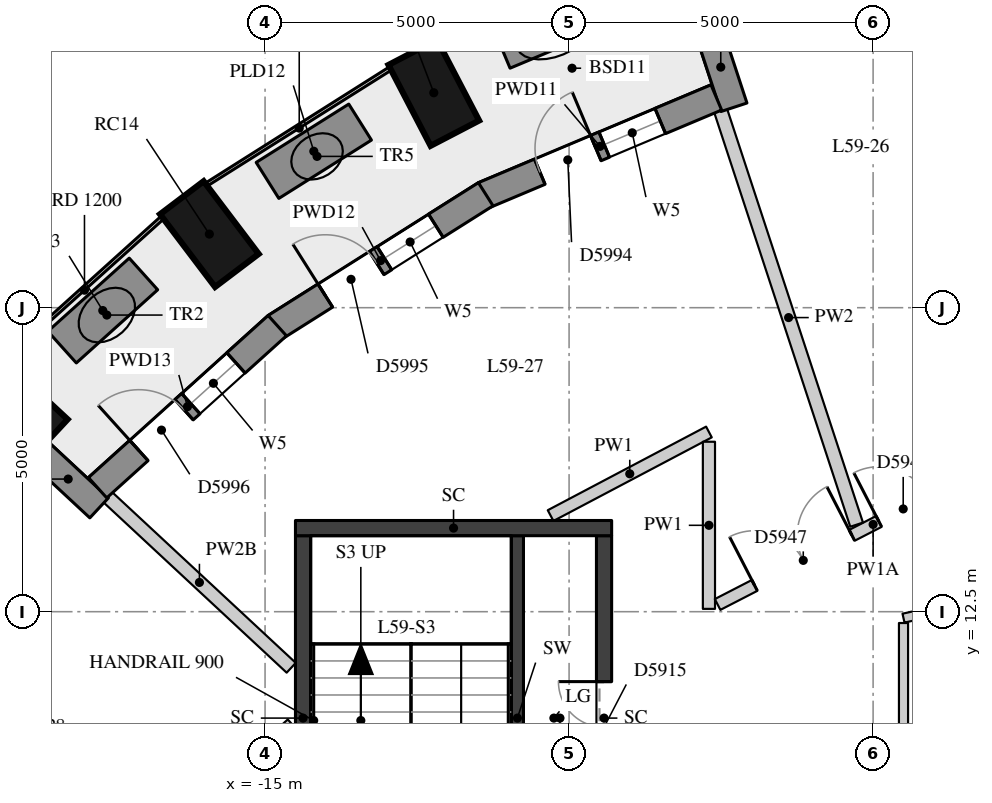
"""IFC4 building model, lengths in metres.
Left out: names, types, materials, properties, quantities, classifications, styles, units other than length and angle.
Written with IfcOpenShell. Run it as: python <this file> out.ifc"""

import sys

from ifc_helpers import new_model, si_unit, direction, frame, frame_2d, origin, origin_2d, place, context, subcontext, project, spatial, rectangle, extrude, element, fill, save


model = new_model("IFC4")
c1 = context("Model", 3, precision=1e-05, world=origin(), true_north=direction((0.0, 1.0)))
c2 = subcontext(c1, "Body", "Model", "MODEL_VIEW")
j1 = project(units=[si_unit("LENGTHUNIT", "METRE"), si_unit("PLANEANGLEUNIT", "RADIAN")], contexts=[c1])
p1 = place(None, origin())
s1 = spatial("IfcSite", under=j1, at=p1, CompositionType="ELEMENT")
p2 = place(p1, origin())
s2 = spatial("IfcBuilding", under=s1, at=p2, CompositionType="ELEMENT")
p3 = place(p2, frame((0.0, 0.0, 209.0)))
s3 = spatial("IfcBuildingStorey", under=s2, at=p3, CompositionType="ELEMENT", Elevation=209.0)
for number, where, z_axis, x_axis in (
    (1, (-12.225, 21.035, 0.0), (0.0, 0.0, 1.0), (-0.462, 0.887, 0.0)),
    (2, (-15.916, 18.71, 0.0), (0.0, 0.0, 1.0), (-0.604, 0.797, 0.0)),
    (3, (-19.102, 15.845, 0.0), (0.0, 0.0, 1.0), (-0.732, 0.681, 0.0)),
):
    element("IfcColumn", number, at=place(p3, frame(where, z_axis=z_axis, x_axis=x_axis)), inside=s3, PredefinedType="COLUMN", context=c2, shape_type="SweptSolid", body=[
        extrude(rectangle(XDim=1.5, YDim=0.9, at=origin_2d()), origin(), (0.0, 0.0, 1.0), 3.3),
    ])
p4 = place(p3, frame((-7.722, 22.117, 0.0), z_axis=(0.0, 0.0, 1.0), x_axis=(0.312062715826, -0.950061504005, 0.0)))
e4 = element("IfcWall", 4, at=p4, inside=s3, PredefinedType="SOLIDWALL", context=c2, shape_type="SweptSolid", body=[
    extrude(rectangle(XDim=1.39, YDim=0.45, at=frame_2d((0.695, 0.0))), origin(), (0.0, 0.0, 1.0), 3.02),
])
p5 = place(p3, frame((-18.747, 15.155, 0.0), z_axis=(0.0, 0.0, 1.0), x_axis=(0.732349544388, -0.680928883831, 0.0)))
e5 = element("IfcWall", 5, at=p5, inside=s3, PredefinedType="SOLIDWALL", context=c2, shape_type="SweptSolid", body=[
    extrude(rectangle(XDim=1.391, YDim=0.45, at=frame_2d((0.696, 0.0))), origin(), (0.0, 0.0, 1.0), 2.57),
])
p6 = place(p3, frame((-7.579, 20.958, 0.0), z_axis=(0.0, 0.0, 1.0), x_axis=(-0.921750495838, -0.387783474923, 0.0)))
e6 = element("IfcWall", 6, at=p6, inside=s3, PredefinedType="SOLIDWALL", context=c2, shape_type="SweptSolid", body=[
    extrude(rectangle(XDim=4.15, YDim=0.45, at=frame_2d((2.075, 0.0))), origin(), (0.0, 0.0, 1.0), 3.02),
])
p7 = place(p6, frame((1.0, 0.0, 0.4)))
e7 = element("IfcOpeningElement", 7, at=p7, cuts=e6, PredefinedType="OPENING", context=c2, shape_type="SweptSolid", body=[
    extrude(rectangle(XDim=1.0, YDim=1.75, at=frame_2d((0.5, 0.875))), frame((0.0, 0.235, 0.0), z_axis=(0.0, -1.0, 0.0), x_axis=(1.0, 0.0, 0.0)), (0.0, 0.0, 1.0), 0.47),
])
p8 = place(p6, frame((2.15, 0.0, 0.0)))
e8 = element("IfcOpeningElement", 8, at=p8, cuts=e6, PredefinedType="OPENING", context=c2, shape_type="SweptSolid", body=[
    extrude(rectangle(XDim=1.0, YDim=2.15, at=frame_2d((0.5, 1.075))), frame((0.0, 0.235, 0.0), z_axis=(0.0, -1.0, 0.0), x_axis=(1.0, 0.0, 0.0)), (0.0, 0.0, 1.0), 0.47),
])
p9 = place(p3, frame((-11.371, 19.366, 0.0), z_axis=(0.0, 0.0, 1.0), x_axis=(-0.845443515445, -0.534064848302, 0.0)))
e9 = element("IfcWall", 9, at=p9, inside=s3, PredefinedType="SOLIDWALL", context=c2, shape_type="SweptSolid", body=[
    extrude(rectangle(XDim=4.091, YDim=0.45, at=frame_2d((2.045, 0.0))), origin(), (0.0, 0.0, 1.0), 3.02),
])
p10 = place(p9, frame((0.97, 0.0, 0.4)))
e10 = element("IfcOpeningElement", 10, at=p10, cuts=e9, PredefinedType="OPENING", context=c2, shape_type="SweptSolid", body=[
    extrude(rectangle(XDim=1.0, YDim=1.75, at=frame_2d((0.5, 0.875))), frame((0.0, 0.235, 0.0), z_axis=(0.0, -1.0, 0.0), x_axis=(1.0, 0.0, 0.0)), (0.0, 0.0, 1.0), 0.47),
])
p11 = place(p9, frame((2.12, 0.0, 0.0)))
e11 = element("IfcOpeningElement", 11, at=p11, cuts=e9, PredefinedType="OPENING", context=c2, shape_type="SweptSolid", body=[
    extrude(rectangle(XDim=1.0, YDim=2.15, at=frame_2d((0.5, 1.075))), frame((0.0, 0.235, 0.0), z_axis=(0.0, -1.0, 0.0), x_axis=(1.0, 0.0, 0.0)), (0.0, 0.0, 1.0), 0.47),
])
p12 = place(p3, frame((-14.799, 17.205, 0.0), z_axis=(0.0, 0.0, 1.0), x_axis=(-0.742488361714, -0.669858964798, 0.0)))
e12 = element("IfcWall", 12, at=p12, inside=s3, PredefinedType="SOLIDWALL", context=c2, shape_type="SweptSolid", body=[
    extrude(rectangle(XDim=3.98, YDim=0.45, at=frame_2d((1.99, 0.0))), origin(), (0.0, 0.0, 1.0), 3.02),
])
p13 = place(p12, frame((0.915, 0.0, 0.4)))
e13 = element("IfcOpeningElement", 13, at=p13, cuts=e12, PredefinedType="OPENING", context=c2, shape_type="SweptSolid", body=[
    extrude(rectangle(XDim=1.0, YDim=1.75, at=frame_2d((0.5, 0.875))), frame((0.0, 0.235, 0.0), z_axis=(0.0, -1.0, 0.0), x_axis=(1.0, 0.0, 0.0)), (0.0, 0.0, 1.0), 0.47),
])
p14 = place(p12, frame((2.065, 0.0, 0.0)))
e14 = element("IfcOpeningElement", 14, at=p14, cuts=e12, PredefinedType="OPENING", context=c2, shape_type="SweptSolid", body=[
    extrude(rectangle(XDim=1.0, YDim=2.15, at=frame_2d((0.5, 1.075))), frame((0.0, 0.235, 0.0), z_axis=(0.0, -1.0, 0.0), x_axis=(1.0, 0.0, 0.0)), (0.0, 0.0, 1.0), 0.47),
])
for number, where, z_axis, x_axis in (
    (15, (-9.446, 22.458, 0.0), (0.0, 0.0, 1.0), (-0.922, -0.387, 0.0)),
    (16, (-13.437, 20.552, 0.0), (0.0, 0.0, 1.0), (-0.846, -0.533, 0.0)),
    (17, (-17.0, 18.055, 0.0), (0.0, 0.0, 1.0), (-0.743, -0.669, 0.0)),
):
    element("IfcWall", number, at=place(p3, frame(where, z_axis=z_axis, x_axis=x_axis)), inside=s3, PredefinedType="USERDEFINED", context=c2, shape_type="SweptSolid", body=[
        extrude(rectangle(XDim=1.8, YDim=0.7, at=frame_2d((0.9, 0.0))), origin(), (0.0, 0.0, 1.0), 0.75),
    ])
p15 = place(p3, frame((-10.85, 7.75, 0.0), z_axis=(0.0, 0.0, 1.0), x_axis=(0.0, 1.0, 0.0)))
e18 = element("IfcWall", 18, at=p15, inside=s3, PredefinedType="SHEAR", context=c2, shape_type="SweptSolid", body=[
    extrude(rectangle(XDim=6.0, YDim=0.2, at=frame_2d((3.0, 0.0))), origin(), (0.0, 0.0, 1.0), 3.02),
])
p16 = place(p15, frame((0.1, 0.0, 0.0)))
e19 = element("IfcOpeningElement", 19, at=p16, cuts=e18, PredefinedType="OPENING", context=c2, shape_type="SweptSolid", body=[
    extrude(rectangle(XDim=1.5, YDim=2.1, at=frame_2d((0.75, 1.05))), frame((0.0, 0.11, 0.0), z_axis=(0.0, -1.0, 0.0), x_axis=(1.0, 0.0, 0.0)), (0.0, 0.0, 1.0), 0.22),
])
p17 = place(p3, frame((-14.375, 7.75, -0.28), z_axis=(0.0, 0.0, 1.0), x_axis=(0.0, 1.0, 0.0)))
e20 = element("IfcWall", 20, at=p17, inside=s3, PredefinedType="SHEAR", context=c2, shape_type="SweptSolid", body=[
    extrude(rectangle(XDim=6.0, YDim=0.25, at=frame_2d((3.0, 0.0))), origin(), (0.0, 0.0, 1.0), 3.3),
])
p18 = place(p3, frame((-9.425, 7.75, -0.28), z_axis=(0.0, 0.0, 1.0), x_axis=(0.0, 1.0, 0.0)))
e21 = element("IfcWall", 21, at=p18, inside=s3, PredefinedType="SHEAR", context=c2, shape_type="SweptSolid", body=[
    extrude(rectangle(XDim=6.0, YDim=0.25, at=frame_2d((3.0, 0.0))), origin(), (0.0, 0.0, 1.0), 3.3),
])
p19 = place(p18, frame((2.1, 0.0, 0.28)))
e22 = element("IfcOpeningElement", 22, at=p19, cuts=e21, PredefinedType="OPENING", context=c2, shape_type="SweptSolid", body=[
    extrude(rectangle(XDim=1.5, YDim=2.1, at=frame_2d((0.75, 1.05))), frame((0.0, 0.135, 0.0), z_axis=(0.0, -1.0, 0.0), x_axis=(1.0, 0.0, 0.0)), (0.0, 0.0, 1.0), 0.27),
])
p20 = place(p3, frame((-14.5, 13.875, -0.28), z_axis=(0.0, 0.0, 1.0), x_axis=(1.0, 0.0, 0.0)))
e23 = element("IfcWall", 23, at=p20, inside=s3, PredefinedType="SHEAR", context=c2, shape_type="SweptSolid", body=[
    extrude(rectangle(XDim=5.2, YDim=0.25, at=frame_2d((2.6, 0.0))), origin(), (0.0, 0.0, 1.0), 3.3),
])
p21 = place(p3, frame((-16.24, 9.136, 0.0), z_axis=(0.0, 0.0, 1.0), x_axis=(0.74251608424, 0.66982823518, 0.0)))
e24 = element("IfcWall", 24, at=p21, inside=s3, PredefinedType="PARTITIONING", context=c2, shape_type="SweptSolid", body=[
    extrude(rectangle(XDim=2.264, YDim=0.2, at=frame_2d((1.132, 0.0))), origin(), (0.0, 0.0, 1.0), 3.02),
])
p22 = place(p3, frame((-10.304, 14.081, 0.0), z_axis=(0.0, 0.0, 1.0), x_axis=(0.884325802624, 0.466870297635, 0.0)))
e25 = element("IfcWall", 25, at=p22, inside=s3, PredefinedType="PARTITIONING", context=c2, shape_type="SweptSolid", body=[
    extrude(rectangle(XDim=2.945, YDim=0.2, at=frame_2d((1.472, 0.0))), origin(), (0.0, 0.0, 1.0), 3.02),
])
p23 = place(p3, frame((-7.7, 15.295, 0.0), z_axis=(0.0, 0.0, 1.0), x_axis=(0.0, -1.0, 0.0)))
e26 = element("IfcWall", 26, at=p23, inside=s3, PredefinedType="PARTITIONING", context=c2, shape_type="SweptSolid", body=[
    extrude(rectangle(XDim=2.749, YDim=0.2, at=frame_2d((1.375, 0.0))), origin(), (0.0, 0.0, 1.0), 3.02),
])
p24 = place(p3, frame((-7.557, 12.619, 0.0), z_axis=(0.0, 0.0, 1.0), x_axis=(0.889086035914, 0.457740123588, 0.0)))
e27 = element("IfcWall", 27, at=p24, inside=s3, PredefinedType="PARTITIONING", context=c2, shape_type="SweptSolid", body=[
    extrude(rectangle(XDim=5.753, YDim=0.2, at=frame_2d((2.877, 0.0))), origin(), (0.0, 0.0, 1.0), 2.57),
])
p25 = place(p24, frame((2.983, 0.0, 0.0)))
e28 = element("IfcOpeningElement", 28, at=p25, cuts=e27, PredefinedType="OPENING", context=c2, shape_type="SweptSolid", body=[
    extrude(rectangle(XDim=0.9, YDim=2.1, at=frame_2d((0.45, 1.05))), frame((0.0, 0.11, 0.0), z_axis=(0.0, -1.0, 0.0), x_axis=(1.0, 0.0, 0.0)), (0.0, 0.0, 1.0), 0.22),
])
p26 = place(p24, frame((0.685, 0.0, 0.0)))
e29 = element("IfcOpeningElement", 29, at=p26, cuts=e27, PredefinedType="OPENING", context=c2, shape_type="SweptSolid", body=[
    extrude(rectangle(XDim=1.8, YDim=2.1, at=frame_2d((0.9, 1.05))), frame((0.0, 0.11, 0.0), z_axis=(0.0, -1.0, 0.0), x_axis=(1.0, 0.0, 0.0)), (0.0, 0.0, 1.0), 0.22),
])
p27 = place(p3, frame((-4.5, 12.394, 0.0), z_axis=(0.0, 0.0, 1.0), x_axis=(0.976122911094, 0.217218927437, 0.0)))
e30 = element("IfcWall", 30, at=p27, inside=s3, PredefinedType="PARTITIONING", context=c2, shape_type="SweptSolid", body=[
    extrude(rectangle(XDim=1.971, YDim=0.15, at=frame_2d((0.986, 0.0))), origin(), (0.0, 0.0, 1.0), 3.02),
])
p28 = place(p3, frame((-4.5, 8.77, 0.0), z_axis=(0.0, 0.0, 1.0), x_axis=(0.0, 1.0, 0.0)))
e31 = element("IfcWall", 31, at=p28, inside=s3, PredefinedType="PARTITIONING", context=c2, shape_type="SweptSolid", body=[
    extrude(rectangle(XDim=3.543, YDim=0.15, at=frame_2d((1.772, 0.0))), origin(), (0.0, 0.0, 1.0), 3.02),
])
p29 = place(p3, frame((-7.508, 20.743, 0.0), z_axis=(0.0, 0.0, 1.0), x_axis=(0.31199567476, -0.950083522082, 0.0)))
e32 = element("IfcWall", 32, at=p29, inside=s3, PredefinedType="PARTITIONING", context=c2, shape_type="SweptSolid", body=[
    extrude(rectangle(XDim=7.17, YDim=0.22, at=frame_2d((3.585, 0.0))), origin(), (0.0, 0.0, 1.0), 3.02),
])
p30 = place(p3, frame((-17.589, 14.385, 0.0), z_axis=(0.0, 0.0, 1.0), x_axis=(0.732287016614, -0.680996127227, 0.0)))
e33 = element("IfcWall", 33, at=p30, inside=s3, PredefinedType="PARTITIONING", context=c2, shape_type="SweptSolid", body=[
    extrude(rectangle(XDim=4.122, YDim=0.22, at=frame_2d((2.061, 0.0))), origin(), (0.0, 0.0, 1.0), 2.57),
])
p31 = place(p7, origin())
e34 = element("IfcWindow", 34, at=p31, inside=s3, PartitioningType="SINGLE_PANEL", PredefinedType="WINDOW", context=c2, shape_type="SweptSolid", body=[
    extrude(rectangle(XDim=1.0, YDim=1.75, at=frame_2d((0.5, 0.875))), frame((0.0, 0.035, 0.0), z_axis=(0.0, -1.0, 0.0), x_axis=(1.0, 0.0, 0.0)), (0.0, 0.0, 1.0), 0.06),
])
fill(e7, e34)
p32 = place(p8, frame((1.0, 0.0, 0.0), z_axis=(0.0, 0.0, 1.0), x_axis=(-1.0, 0.0, 0.0)))
e35 = element("IfcDoor", 35, at=p32, inside=s3, OperationType="SINGLE_SWING_RIGHT", PredefinedType="DOOR", context=c2, shape_type="SweptSolid", body=[
    extrude(rectangle(XDim=1.0, YDim=2.15, at=frame_2d((0.5, 1.075))), frame((0.0, 0.075, 0.0), z_axis=(0.0, -1.0, 0.0), x_axis=(1.0, 0.0, 0.0)), (0.0, 0.0, 1.0), 0.05),
])
fill(e8, e35)
p33 = place(p10, origin())
e36 = element("IfcWindow", 36, at=p33, inside=s3, PartitioningType="SINGLE_PANEL", PredefinedType="WINDOW", context=c2, shape_type="SweptSolid", body=[
    extrude(rectangle(XDim=1.0, YDim=1.75, at=frame_2d((0.5, 0.875))), frame((0.0, 0.035, 0.0), z_axis=(0.0, -1.0, 0.0), x_axis=(1.0, 0.0, 0.0)), (0.0, 0.0, 1.0), 0.06),
])
fill(e10, e36)
p34 = place(p11, frame((1.0, 0.0, 0.0), z_axis=(0.0, 0.0, 1.0), x_axis=(-1.0, 0.0, 0.0)))
e37 = element("IfcDoor", 37, at=p34, inside=s3, OperationType="SINGLE_SWING_LEFT", PredefinedType="DOOR", context=c2, shape_type="SweptSolid", body=[
    extrude(rectangle(XDim=1.0, YDim=2.15, at=frame_2d((0.5, 1.075))), frame((0.0, 0.075, 0.0), z_axis=(0.0, -1.0, 0.0), x_axis=(1.0, 0.0, 0.0)), (0.0, 0.0, 1.0), 0.05),
])
fill(e11, e37)
p35 = place(p13, origin())
e38 = element("IfcWindow", 38, at=p35, inside=s3, PartitioningType="SINGLE_PANEL", PredefinedType="WINDOW", context=c2, shape_type="SweptSolid", body=[
    extrude(rectangle(XDim=1.0, YDim=1.75, at=frame_2d((0.5, 0.875))), frame((0.0, 0.035, 0.0), z_axis=(0.0, -1.0, 0.0), x_axis=(1.0, 0.0, 0.0)), (0.0, 0.0, 1.0), 0.06),
])
fill(e13, e38)
p36 = place(p14, frame((1.0, 0.0, 0.0), z_axis=(0.0, 0.0, 1.0), x_axis=(-1.0, 0.0, 0.0)))
e39 = element("IfcDoor", 39, at=p36, inside=s3, OperationType="SINGLE_SWING_LEFT", PredefinedType="DOOR", context=c2, shape_type="SweptSolid", body=[
    extrude(rectangle(XDim=1.0, YDim=2.15, at=frame_2d((0.5, 1.075))), frame((0.0, 0.075, 0.0), z_axis=(0.0, -1.0, 0.0), x_axis=(1.0, 0.0, 0.0)), (0.0, 0.0, 1.0), 0.05),
])
fill(e14, e39)
p37 = place(p19, origin())
e40 = element("IfcDoor", 40, at=p37, inside=s3, OperationType="DOUBLE_DOOR_SINGLE_SWING", PredefinedType="DOOR", context=c2, shape_type="SweptSolid", body=[
    extrude(rectangle(XDim=1.5, YDim=2.1, at=frame_2d((0.75, 1.05))), frame((0.0, 0.025, 0.0), z_axis=(0.0, -1.0, 0.0), x_axis=(1.0, 0.0, 0.0)), (0.0, 0.0, 1.0), 0.05),
])
fill(e22, e40)
p38 = place(p25, origin())
e41 = element("IfcDoor", 41, at=p38, inside=s3, OperationType="SINGLE_SWING_LEFT", PredefinedType="DOOR", context=c2, shape_type="SweptSolid", body=[
    extrude(rectangle(XDim=0.9, YDim=2.1, at=frame_2d((0.45, 1.05))), frame((0.0, 0.025, 0.0), z_axis=(0.0, -1.0, 0.0), x_axis=(1.0, 0.0, 0.0)), (0.0, 0.0, 1.0), 0.05),
])
fill(e28, e41)
p39 = place(p26, origin())
e42 = element("IfcDoor", 42, at=p39, inside=s3, OperationType="DOUBLE_DOOR_SINGLE_SWING", PredefinedType="DOOR", context=c2, shape_type="SweptSolid", body=[
    extrude(rectangle(XDim=1.8, YDim=2.1, at=frame_2d((0.9, 1.05))), frame((0.0, 0.025, 0.0), z_axis=(0.0, -1.0, 0.0), x_axis=(1.0, 0.0, 0.0)), (0.0, 0.0, 1.0), 0.05),
])
fill(e29, e42)
save(model, sys.argv[1])
